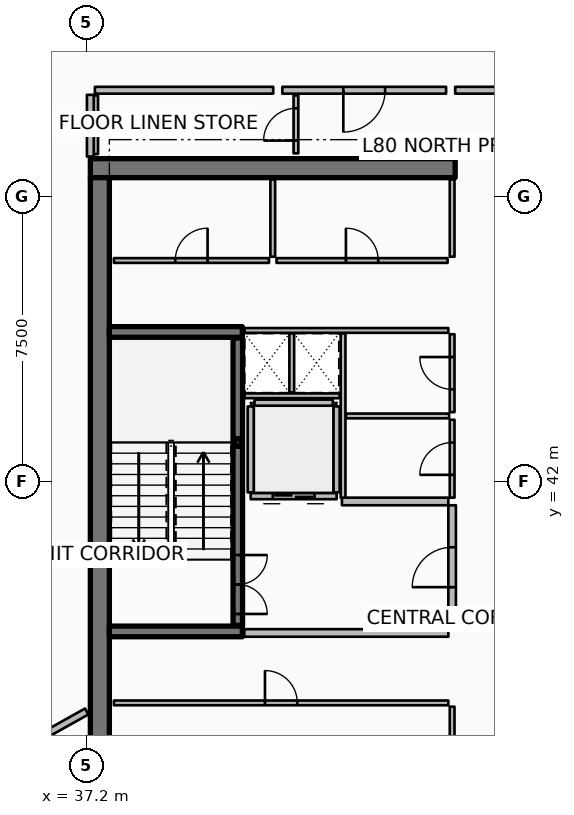
"""IFC4 building model, lengths in metres.
Left out: names, types, materials, properties, quantities, classifications, styles, units other than length and angle.
Written with IfcOpenShell. Run it as: python <this file> out.ifc"""

import sys

from ifc_helpers import new_model, si_unit, direction, frame, frame_2d, origin, origin_2d, place, context, subcontext, project, spatial, rectangle, hollow_rectangle, extrude, element, fill, save


model = new_model("IFC4")
c1 = context("Model", 3, precision=1e-05, world=origin(), true_north=direction((0.0, 1.0)))
c2 = subcontext(c1, "Body", "Model", "MODEL_VIEW")
j1 = project(units=[si_unit("LENGTHUNIT", "METRE"), si_unit("PLANEANGLEUNIT", "RADIAN")], contexts=[c1])
p1 = place(None, origin())
s1 = spatial("IfcSite", under=j1, at=p1, CompositionType="ELEMENT")
p2 = place(p1, origin())
s2 = spatial("IfcBuilding", under=s1, at=p2, CompositionType="ELEMENT")
p3 = place(p2, frame((0.0, 0.0, 317.9)))
s3 = spatial("IfcBuildingStorey", under=s2, at=p3, CompositionType="ELEMENT", Elevation=317.9)
p4 = place(p3, frame((37.3, 50.25, 0.0), z_axis=(0.0, 0.0, 1.0), x_axis=(1.0, 0.0, 0.0)))
e1 = element("IfcWall", 1, at=p4, inside=s3, PredefinedType="SHEAR", context=c2, shape_type="SweptSolid", body=[
    extrude(rectangle(XDim=9.6, YDim=0.5, at=frame_2d((4.8, 0.0))), origin(), (0.0, 0.0, 1.0), 4.2),
])
p5 = place(p3, frame((37.55, 34.0, 0.0), z_axis=(0.0, 0.0, 1.0), x_axis=(0.0, 1.0, 0.0)))
e2 = element("IfcWall", 2, at=p5, inside=s3, PredefinedType="SHEAR", context=c2, shape_type="SweptSolid", body=[
    extrude(rectangle(XDim=16.0, YDim=0.5, at=frame_2d((8.0, 0.0))), origin(), (0.0, 0.0, 1.0), 4.2),
])
for number, where, z_axis, x_axis in (
    (3, (37.8, 38.06, 0.0), (0.0, 0.0, 1.0), (1.0, 0.0, 0.0)),
    (4, (37.8, 45.94, 0.0), (0.0, 0.0, 1.0), (1.0, 0.0, 0.0)),
):
    element("IfcWall", number, at=place(p3, frame(where, z_axis=z_axis, x_axis=x_axis)), inside=s3, PredefinedType="SHEAR", context=c2, shape_type="SweptSolid", body=[
        extrude(rectangle(XDim=3.5, YDim=0.28, at=frame_2d((1.75, 0.0))), origin(), (0.0, 0.0, 1.0), 4.2),
    ])
p6 = place(p3, frame((41.18, 43.03, 0.0), z_axis=(0.0, 0.0, 1.0), x_axis=(1.0, 0.0, 0.0)))
e5 = element("IfcColumn", 5, at=p6, inside=s3, PredefinedType="COLUMN", context=c2, shape_type="SweptSolid", body=[
    extrude(hollow_rectangle(XDim=0.2, YDim=0.2, WallThickness=0.01, InnerFilletRadius=0.01, OuterFilletRadius=0.02, at=origin_2d()), origin(), (0.0, 0.0, 1.0), 1.895),
])
p7 = place(p3, frame((41.18, 38.22, 0.0), z_axis=(0.0, 0.0, 1.0), x_axis=(0.0, 1.0, 0.0)))
e6 = element("IfcWall", 6, at=p7, inside=s3, PredefinedType="SOLIDWALL", context=c2, shape_type="SweptSolid", body=[
    extrude(rectangle(XDim=7.56, YDim=0.25, at=frame_2d((3.78, 0.0))), origin(), (0.0, 0.0, 1.0), 3.94),
])
p8 = place(p7, frame((0.3, 0.0, 0.0)))
e7 = element("IfcOpeningElement", 7, at=p8, cuts=e6, PredefinedType="OPENING", context=c2, shape_type="SweptSolid", body=[
    extrude(rectangle(XDim=1.55, YDim=2.15, at=frame_2d((0.775, 1.075))), frame((0.0, 0.135, 0.0), z_axis=(0.0, -1.0, 0.0), x_axis=(1.0, 0.0, 0.0)), (0.0, 0.0, 1.0), 0.27),
])
p9 = place(p3, frame((43.78, 41.62, 0.0), z_axis=(0.0, 0.0, 1.0), x_axis=(-1.0, 0.0, 0.0)))
e8 = element("IfcWall", 8, at=p9, inside=s3, PredefinedType="PARTITIONING", context=c2, shape_type="SweptSolid", body=[
    extrude(rectangle(XDim=2.26, YDim=0.16, at=frame_2d((1.13, 0.0))), origin(), (0.0, 0.0, 1.0), 3.94),
])
p10 = place(p9, frame((0.58, 0.0, 0.0)))
e9 = element("IfcOpeningElement", 9, at=p10, cuts=e8, PredefinedType="OPENING", context=c2, shape_type="SweptSolid", body=[
    extrude(rectangle(XDim=1.1, YDim=2.1, at=frame_2d((0.55, 1.05))), frame((0.0, 0.09, 0.0), z_axis=(0.0, -1.0, 0.0), x_axis=(1.0, 0.0, 0.0)), (0.0, 0.0, 1.0), 0.18),
])
for number, where, z_axis, x_axis in (
    (10, (43.78, 41.72, 0.0), (0.0, 0.0, 1.0), (0.0, 1.0, 0.0)),
    (11, (41.52, 41.72, 0.0), (0.0, 0.0, 1.0), (0.0, 1.0, 0.0)),
):
    element("IfcWall", number, at=place(p3, frame(where, z_axis=z_axis, x_axis=x_axis)), inside=s3, PredefinedType="PARTITIONING", context=c2, shape_type="SweptSolid", body=[
        extrude(rectangle(XDim=2.26, YDim=0.16, at=frame_2d((1.13, 0.0))), origin(), (0.0, 0.0, 1.0), 3.94),
    ])
p11 = place(p3, frame((41.62, 44.08, 0.0), z_axis=(0.0, 0.0, 1.0), x_axis=(1.0, 0.0, 0.0)))
e12 = element("IfcWall", 12, at=p11, inside=s3, PredefinedType="PARTITIONING", context=c2, shape_type="SweptSolid", body=[
    extrude(rectangle(XDim=2.06, YDim=0.16, at=frame_2d((1.03, 0.0))), origin(), (0.0, 0.0, 1.0), 3.94),
])
p12 = place(p3, frame((46.82, 34.05, 0.0), z_axis=(0.0, 0.0, 1.0), x_axis=(0.0, 1.0, 0.0)))
e13 = element("IfcWall", 13, at=p12, inside=s3, PredefinedType="PARTITIONING", context=c2, shape_type="SweptSolid", body=[
    extrude(rectangle(XDim=2.03, YDim=0.125, at=frame_2d((1.015, 0.0))), origin(), (0.0, 0.0, 1.0), 3.38),
])
p13 = place(p3, frame((37.92, 36.18, 0.0), z_axis=(0.0, 0.0, 1.0), x_axis=(1.0, 0.0, 0.0)))
e14 = element("IfcWall", 14, at=p13, inside=s3, PredefinedType="PARTITIONING", context=c2, shape_type="SweptSolid", body=[
    extrude(rectangle(XDim=8.8, YDim=0.125, at=frame_2d((4.4, 0.0))), origin(), (0.0, 0.0, 1.0), 3.38),
])
p14 = place(p13, frame((3.975, 0.0, 0.0)))
e15 = element("IfcOpeningElement", 15, at=p14, cuts=e14, PredefinedType="OPENING", context=c2, shape_type="SweptSolid", body=[
    extrude(rectangle(XDim=0.85, YDim=2.06, at=frame_2d((0.425, 1.03))), frame((0.0, 0.073, 0.0), z_axis=(0.0, -1.0, 0.0), x_axis=(1.0, 0.0, 0.0)), (0.0, 0.0, 1.0), 0.145),
])
for number, where, z_axis, x_axis in (
    (16, (46.82, 47.92, 0.0), (0.0, 0.0, 1.0), (0.0, 1.0, 0.0)),
    (17, (42.1, 47.92, 0.0), (0.0, 0.0, 1.0), (0.0, 1.0, 0.0)),
):
    element("IfcWall", number, at=place(p3, frame(where, z_axis=z_axis, x_axis=x_axis)), inside=s3, PredefinedType="PARTITIONING", context=c2, shape_type="SweptSolid", body=[
        extrude(rectangle(XDim=2.03, YDim=0.125, at=frame_2d((1.015, 0.0))), origin(), (0.0, 0.0, 1.0), 3.38),
    ])
p15 = place(p3, frame((37.92, 47.82, 0.0), z_axis=(0.0, 0.0, 1.0), x_axis=(1.0, 0.0, 0.0)))
e18 = element("IfcWall", 18, at=p15, inside=s3, PredefinedType="PARTITIONING", context=c2, shape_type="SweptSolid", body=[
    extrude(rectangle(XDim=4.08, YDim=0.125, at=frame_2d((2.04, 0.0))), origin(), (0.0, 0.0, 1.0), 3.38),
])
p16 = place(p15, frame((1.615, 0.0, 0.0)))
e19 = element("IfcOpeningElement", 19, at=p16, cuts=e18, PredefinedType="OPENING", context=c2, shape_type="SweptSolid", body=[
    extrude(rectangle(XDim=0.85, YDim=2.06, at=frame_2d((0.425, 1.03))), frame((0.0, 0.073, 0.0), z_axis=(0.0, -1.0, 0.0), x_axis=(1.0, 0.0, 0.0)), (0.0, 0.0, 1.0), 0.145),
])
p17 = place(p3, frame((42.2, 47.82, 0.0), z_axis=(0.0, 0.0, 1.0), x_axis=(1.0, 0.0, 0.0)))
e20 = element("IfcWall", 20, at=p17, inside=s3, PredefinedType="PARTITIONING", context=c2, shape_type="SweptSolid", body=[
    extrude(rectangle(XDim=4.5, YDim=0.125, at=frame_2d((2.25, 0.0))), origin(), (0.0, 0.0, 1.0), 3.38),
])
p18 = place(p17, frame((1.825, 0.0, 0.0)))
e21 = element("IfcOpeningElement", 21, at=p18, cuts=e20, PredefinedType="OPENING", context=c2, shape_type="SweptSolid", body=[
    extrude(rectangle(XDim=0.85, YDim=2.06, at=frame_2d((0.425, 1.03))), frame((0.0, 0.073, 0.0), z_axis=(0.0, -1.0, 0.0), x_axis=(1.0, 0.0, 0.0)), (0.0, 0.0, 1.0), 0.145),
])
p19 = place(p3, frame((41.35, 38.02, 0.0), z_axis=(0.0, 0.0, 1.0), x_axis=(1.0, 0.0, 0.0)))
e22 = element("IfcWall", 22, at=p19, inside=s3, PredefinedType="PARTITIONING", context=c2, shape_type="SweptSolid", body=[
    extrude(rectangle(XDim=5.37, YDim=0.2, at=frame_2d((2.685, 0.0))), origin(), (0.0, 0.0, 1.0), 3.94),
])
p20 = place(p3, frame((43.92, 41.48, 0.0), z_axis=(0.0, 0.0, 1.0), x_axis=(1.0, 0.0, 0.0)))
e23 = element("IfcWall", 23, at=p20, inside=s3, PredefinedType="PARTITIONING", context=c2, shape_type="SweptSolid", body=[
    extrude(rectangle(XDim=2.8, YDim=0.2, at=frame_2d((1.4, 0.0))), origin(), (0.0, 0.0, 1.0), 3.94),
])
p21 = place(p3, frame((46.82, 38.12, 0.0), z_axis=(0.0, 0.0, 1.0), x_axis=(0.0, 1.0, 0.0)))
e24 = element("IfcWall", 24, at=p21, inside=s3, PredefinedType="PARTITIONING", context=c2, shape_type="SweptSolid", body=[
    extrude(rectangle(XDim=3.26, YDim=0.2, at=frame_2d((1.63, 0.0))), origin(), (0.0, 0.0, 1.0), 3.94),
])
p22 = place(p21, frame((1.105, 0.0, 0.0)))
e25 = element("IfcOpeningElement", 25, at=p22, cuts=e24, PredefinedType="OPENING", context=c2, shape_type="SweptSolid", body=[
    extrude(rectangle(XDim=1.05, YDim=2.1, at=frame_2d((0.525, 1.05))), frame((0.0, 0.11, 0.0), z_axis=(0.0, -1.0, 0.0), x_axis=(1.0, 0.0, 0.0)), (0.0, 0.0, 1.0), 0.22),
])
p23 = place(p3, frame((41.36, 45.98, 0.0), z_axis=(0.0, 0.0, 1.0), x_axis=(1.0, 0.0, 0.0)))
e26 = element("IfcWall", 26, at=p23, inside=s3, PredefinedType="PARTITIONING", context=c2, shape_type="SweptSolid", body=[
    extrude(rectangle(XDim=5.36, YDim=0.125, at=frame_2d((2.68, 0.0))), origin(), (0.0, 0.0, 1.0), 3.38),
])
p24 = place(p3, frame((41.36, 44.26, 0.0), z_axis=(0.0, 0.0, 1.0), x_axis=(1.0, 0.0, 0.0)))
e27 = element("IfcWall", 27, at=p24, inside=s3, PredefinedType="PARTITIONING", context=c2, shape_type="SweptSolid", body=[
    extrude(rectangle(XDim=2.5, YDim=0.125, at=frame_2d((1.25, 0.0))), origin(), (0.0, 0.0, 1.0), 3.38),
])
p25 = place(p3, frame((42.6, 44.35, 0.0), z_axis=(0.0, 0.0, 1.0), x_axis=(0.0, 1.0, 0.0)))
e28 = element("IfcWall", 28, at=p25, inside=s3, PredefinedType="PARTITIONING", context=c2, shape_type="SweptSolid", body=[
    extrude(rectangle(XDim=1.55, YDim=0.125, at=frame_2d((0.775, 0.0))), origin(), (0.0, 0.0, 1.0), 3.38),
])
p26 = place(p3, frame((43.95, 41.58, 0.0), z_axis=(0.0, 0.0, 1.0), x_axis=(0.0, 1.0, 0.0)))
e29 = element("IfcWall", 29, at=p26, inside=s3, PredefinedType="PARTITIONING", context=c2, shape_type="SweptSolid", body=[
    extrude(rectangle(XDim=4.32, YDim=0.125, at=frame_2d((2.16, 0.0))), origin(), (0.0, 0.0, 1.0), 3.38),
])
p27 = place(p3, frame((44.03, 43.73, 0.0), z_axis=(0.0, 0.0, 1.0), x_axis=(1.0, 0.0, 0.0)))
e30 = element("IfcWall", 30, at=p27, inside=s3, PredefinedType="PARTITIONING", context=c2, shape_type="SweptSolid", body=[
    extrude(rectangle(XDim=2.71, YDim=0.125, at=frame_2d((1.355, 0.0))), origin(), (0.0, 0.0, 1.0), 3.38),
])
p28 = place(p3, frame((46.82, 41.58, 0.0), z_axis=(0.0, 0.0, 1.0), x_axis=(0.0, 1.0, 0.0)))
e31 = element("IfcWall", 31, at=p28, inside=s3, PredefinedType="PARTITIONING", context=c2, shape_type="SweptSolid", body=[
    extrude(rectangle(XDim=2.05, YDim=0.125, at=frame_2d((1.025, 0.0))), origin(), (0.0, 0.0, 1.0), 3.38),
])
p29 = place(p28, frame((0.6, 0.0, 0.0)))
e32 = element("IfcOpeningElement", 32, at=p29, cuts=e31, PredefinedType="OPENING", context=c2, shape_type="SweptSolid", body=[
    extrude(rectangle(XDim=0.85, YDim=2.06, at=frame_2d((0.425, 1.03))), frame((0.0, 0.073, 0.0), z_axis=(0.0, -1.0, 0.0), x_axis=(1.0, 0.0, 0.0)), (0.0, 0.0, 1.0), 0.145),
])
p30 = place(p3, frame((46.82, 43.83, 0.0), z_axis=(0.0, 0.0, 1.0), x_axis=(0.0, 1.0, 0.0)))
e33 = element("IfcWall", 33, at=p30, inside=s3, PredefinedType="PARTITIONING", context=c2, shape_type="SweptSolid", body=[
    extrude(rectangle(XDim=2.05, YDim=0.125, at=frame_2d((1.025, 0.0))), origin(), (0.0, 0.0, 1.0), 3.38),
])
p31 = place(p30, frame((0.6, 0.0, 0.0)))
e34 = element("IfcOpeningElement", 34, at=p31, cuts=e33, PredefinedType="OPENING", context=c2, shape_type="SweptSolid", body=[
    extrude(rectangle(XDim=0.85, YDim=2.06, at=frame_2d((0.425, 1.03))), frame((0.0, 0.073, 0.0), z_axis=(0.0, -1.0, 0.0), x_axis=(1.0, 0.0, 0.0)), (0.0, 0.0, 1.0), 0.145),
])
p32 = place(p3, frame((37.44, 50.62, 0.0), z_axis=(0.0, 0.0, 1.0), x_axis=(0.0, 1.0, 0.0)))
e35 = element("IfcWall", 35, at=p32, inside=s3, PredefinedType="PARTITIONING", context=c2, shape_type="SweptSolid", body=[
    extrude(rectangle(XDim=1.54, YDim=0.125, at=frame_2d((0.77, 0.0))), origin(), (0.0, 0.0, 1.0), 3.38),
])
p33 = place(p3, frame((42.71, 50.64, 0.0), z_axis=(0.0, 0.0, 1.0), x_axis=(0.0, 1.0, 0.0)))
e36 = element("IfcWall", 36, at=p33, inside=s3, PredefinedType="PARTITIONING", context=c2, shape_type="SweptSolid", body=[
    extrude(rectangle(XDim=1.52, YDim=0.125, at=frame_2d((0.76, 0.0))), origin(), (0.0, 0.0, 1.0), 3.38),
])
p34 = place(p33, frame((0.335, 0.0, 0.0)))
e37 = element("IfcOpeningElement", 37, at=p34, cuts=e36, PredefinedType="OPENING", context=c2, shape_type="SweptSolid", body=[
    extrude(rectangle(XDim=0.85, YDim=2.06, at=frame_2d((0.425, 1.03))), frame((0.0, 0.073, 0.0), z_axis=(0.0, -1.0, 0.0), x_axis=(1.0, 0.0, 0.0)), (0.0, 0.0, 1.0), 0.145),
])
p35 = place(p3, frame((37.204, 35.954, 0.0), z_axis=(0.0, 0.0, 1.0), x_axis=(-0.872495191914, -0.488622697064, 0.0)))
e38 = element("IfcWall", 38, at=p35, inside=s3, PredefinedType="PARTITIONING", context=c2, shape_type="SweptSolid", body=[
    extrude(rectangle(XDim=13.462, YDim=0.18, at=frame_2d((6.731, 0.0))), origin(), (0.0, 0.0, 1.0), 3.38),
])
p36 = place(p3, frame((46.661, 52.3, 0.0), z_axis=(0.0, 0.0, 1.0), x_axis=(-1.0, 0.0, 0.0)))
e39 = element("IfcWall", 39, at=p36, inside=s3, PredefinedType="PARTITIONING", context=c2, shape_type="SweptSolid", body=[
    extrude(rectangle(XDim=4.309, YDim=0.18, at=frame_2d((2.155, 0.0))), origin(), (0.0, 0.0, 1.0), 3.38),
])
p37 = place(p36, frame((1.604, 0.0, 0.0)))
e40 = element("IfcOpeningElement", 40, at=p37, cuts=e39, PredefinedType="OPENING", context=c2, shape_type="SweptSolid", body=[
    extrude(rectangle(XDim=1.1, YDim=2.1, at=frame_2d((0.55, 1.05))), frame((0.0, 0.1, 0.0), z_axis=(0.0, -1.0, 0.0), x_axis=(1.0, 0.0, 0.0)), (0.0, 0.0, 1.0), 0.2),
])
p38 = place(p3, frame((50.785, 52.3, 0.0), z_axis=(0.0, 0.0, 1.0), x_axis=(-1.0, 0.0, 0.0)))
e41 = element("IfcWall", 41, at=p38, inside=s3, PredefinedType="PARTITIONING", context=c2, shape_type="SweptSolid", body=[
    extrude(rectangle(XDim=3.884, YDim=0.18, at=frame_2d((1.942, 0.0))), origin(), (0.0, 0.0, 1.0), 3.38),
])
p39 = place(p3, frame((42.112, 52.3, 0.0), z_axis=(0.0, 0.0, 1.0), x_axis=(-1.0, 0.0, 0.0)))
e42 = element("IfcWall", 42, at=p39, inside=s3, PredefinedType="PARTITIONING", context=c2, shape_type="SweptSolid", body=[
    extrude(rectangle(XDim=4.692, YDim=0.18, at=frame_2d((2.346, 0.0))), origin(), (0.0, 0.0, 1.0), 3.38),
])
p40 = place(p3, frame((37.3, 52.18, 0.0), z_axis=(0.0, 0.0, 1.0), x_axis=(0.0, -1.0, 0.0)))
e43 = element("IfcWall", 43, at=p40, inside=s3, PredefinedType="PARTITIONING", context=c2, shape_type="SweptSolid", body=[
    extrude(rectangle(XDim=1.625, YDim=0.18, at=frame_2d((0.812, 0.0))), origin(), (0.0, 0.0, 1.0), 3.38),
])
p41 = place(p3, frame((37.728, 55.735, 0.0), z_axis=(0.0, 0.0, 1.0), x_axis=(-0.717843655189, -0.696204342636, 0.0)))
e44 = element("IfcWall", 44, at=p41, inside=s3, PredefinedType="PARTITIONING", context=c2, shape_type="SweptSolid", body=[
    extrude(rectangle(XDim=4.366, YDim=0.125, at=frame_2d((2.183, 0.0))), origin(), (0.0, 0.0, 1.0), 3.38),
])
p42 = place(p41, frame((1.733, 0.0, 0.0)))
e45 = element("IfcOpeningElement", 45, at=p42, cuts=e44, PredefinedType="OPENING", context=c2, shape_type="SweptSolid", body=[
    extrude(rectangle(XDim=0.9, YDim=2.08, at=frame_2d((0.45, 1.04))), frame((0.0, 0.073, 0.0), z_axis=(0.0, -1.0, 0.0), x_axis=(1.0, 0.0, 0.0)), (0.0, 0.0, 1.0), 0.145),
])
p43 = place(p8, origin())
e46 = element("IfcDoor", 46, at=p43, inside=s3, OperationType="DOUBLE_DOOR_SINGLE_SWING", PredefinedType="DOOR", context=c2, shape_type="SweptSolid", body=[
    extrude(rectangle(XDim=1.55, YDim=2.15, at=frame_2d((0.775, 1.075))), frame((0.0, 0.025, 0.0), z_axis=(0.0, -1.0, 0.0), x_axis=(1.0, 0.0, 0.0)), (0.0, 0.0, 1.0), 0.05),
])
fill(e7, e46)
p44 = place(p10, origin())
e47 = element("IfcDoor", 47, at=p44, inside=s3, OperationType="DOUBLE_DOOR_SLIDING", PredefinedType="DOOR", context=c2, shape_type="SweptSolid", body=[
    extrude(rectangle(XDim=1.1, YDim=2.1, at=frame_2d((0.55, 1.05))), frame((0.0, 0.025, 0.0), z_axis=(0.0, -1.0, 0.0), x_axis=(1.0, 0.0, 0.0)), (0.0, 0.0, 1.0), 0.05),
])
fill(e9, e47)
p45 = place(p14, origin())
e48 = element("IfcDoor", 48, at=p45, inside=s3, OperationType="SINGLE_SWING_LEFT", PredefinedType="DOOR", context=c2, shape_type="SweptSolid", body=[
    extrude(rectangle(XDim=0.85, YDim=2.06, at=frame_2d((0.425, 1.03))), frame((0.0, 0.025, 0.0), z_axis=(0.0, -1.0, 0.0), x_axis=(1.0, 0.0, 0.0)), (0.0, 0.0, 1.0), 0.05),
])
fill(e15, e48)
p46 = place(p16, origin())
e49 = element("IfcDoor", 49, at=p46, inside=s3, OperationType="SINGLE_SWING_RIGHT", PredefinedType="DOOR", context=c2, shape_type="SweptSolid", body=[
    extrude(rectangle(XDim=0.85, YDim=2.06, at=frame_2d((0.425, 1.03))), frame((0.0, 0.025, 0.0), z_axis=(0.0, -1.0, 0.0), x_axis=(1.0, 0.0, 0.0)), (0.0, 0.0, 1.0), 0.05),
])
fill(e19, e49)
p47 = place(p18, origin())
e50 = element("IfcDoor", 50, at=p47, inside=s3, OperationType="SINGLE_SWING_LEFT", PredefinedType="DOOR", context=c2, shape_type="SweptSolid", body=[
    extrude(rectangle(XDim=0.85, YDim=2.06, at=frame_2d((0.425, 1.03))), frame((0.0, 0.025, 0.0), z_axis=(0.0, -1.0, 0.0), x_axis=(1.0, 0.0, 0.0)), (0.0, 0.0, 1.0), 0.05),
])
fill(e21, e50)
p48 = place(p22, origin())
e51 = element("IfcDoor", 51, at=p48, inside=s3, OperationType="SINGLE_SWING_LEFT", PredefinedType="DOOR", context=c2, shape_type="SweptSolid", body=[
    extrude(rectangle(XDim=1.05, YDim=2.1, at=frame_2d((0.525, 1.05))), frame((0.0, 0.025, 0.0), z_axis=(0.0, -1.0, 0.0), x_axis=(1.0, 0.0, 0.0)), (0.0, 0.0, 1.0), 0.05),
])
fill(e25, e51)
p49 = place(p29, origin())
e52 = element("IfcDoor", 52, at=p49, inside=s3, OperationType="SINGLE_SWING_LEFT", PredefinedType="DOOR", context=c2, shape_type="SweptSolid", body=[
    extrude(rectangle(XDim=0.85, YDim=2.06, at=frame_2d((0.425, 1.03))), frame((0.0, 0.025, 0.0), z_axis=(0.0, -1.0, 0.0), x_axis=(1.0, 0.0, 0.0)), (0.0, 0.0, 1.0), 0.05),
])
fill(e32, e52)
p50 = place(p31, origin())
e53 = element("IfcDoor", 53, at=p50, inside=s3, OperationType="SINGLE_SWING_RIGHT", PredefinedType="DOOR", context=c2, shape_type="SweptSolid", body=[
    extrude(rectangle(XDim=0.85, YDim=2.06, at=frame_2d((0.425, 1.03))), frame((0.0, 0.025, 0.0), z_axis=(0.0, -1.0, 0.0), x_axis=(1.0, 0.0, 0.0)), (0.0, 0.0, 1.0), 0.05),
])
fill(e34, e53)
p51 = place(p34, origin())
e54 = element("IfcDoor", 54, at=p51, inside=s3, OperationType="SINGLE_SWING_LEFT", PredefinedType="DOOR", context=c2, shape_type="SweptSolid", body=[
    extrude(rectangle(XDim=0.85, YDim=2.06, at=frame_2d((0.425, 1.03))), frame((0.0, 0.025, 0.0), z_axis=(0.0, -1.0, 0.0), x_axis=(1.0, 0.0, 0.0)), (0.0, 0.0, 1.0), 0.05),
])
fill(e37, e54)
p52 = place(p37, origin())
e55 = element("IfcDoor", 55, at=p52, inside=s3, OperationType="SINGLE_SWING_RIGHT", PredefinedType="DOOR", context=c2, shape_type="SweptSolid", body=[
    extrude(rectangle(XDim=1.1, YDim=2.1, at=frame_2d((0.55, 1.05))), frame((0.0, 0.025, 0.0), z_axis=(0.0, -1.0, 0.0), x_axis=(1.0, 0.0, 0.0)), (0.0, 0.0, 1.0), 0.05),
])
fill(e40, e55)
save(model, sys.argv[1])
